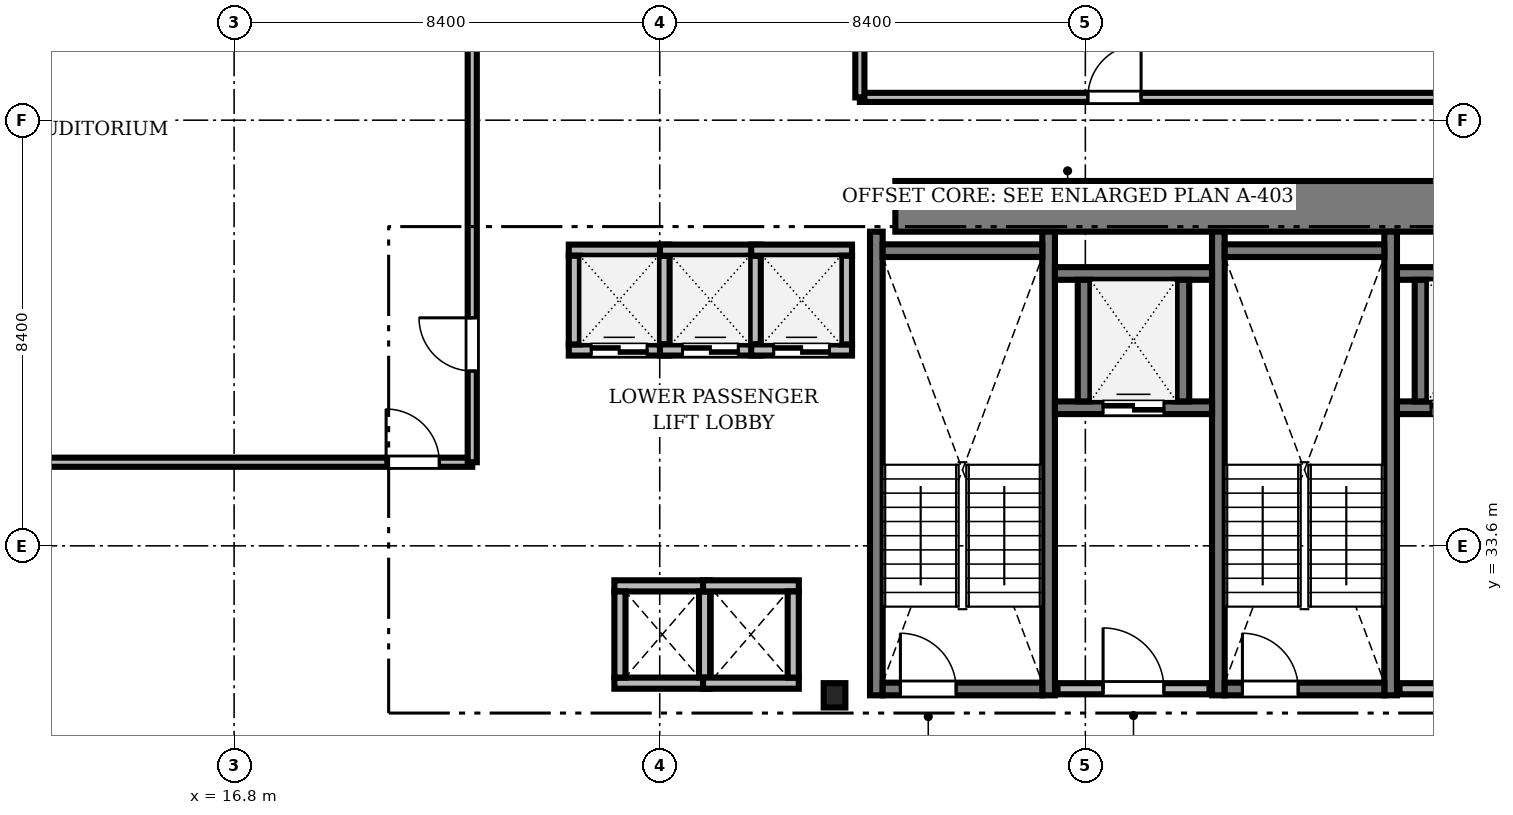
"""IFC4 building model, lengths in metres.
Left out: names, types, materials, properties, quantities, classifications, styles, units other than length and angle.
Written with IfcOpenShell. Run it as: python <this file> out.ifc"""

import sys

from ifc_helpers import new_model, si_unit, direction, frame, frame_2d, origin, origin_2d, place, context, subcontext, project, spatial, rectangle, i_section, extrude, source, transform, mapped, element, fill, save


model = new_model("IFC4")
c1 = context("Model", 3, precision=1e-05, world=origin(), true_north=direction((0.0, 1.0)))
c2 = subcontext(c1, "Body", "Model", "MODEL_VIEW")
j1 = project(units=[si_unit("LENGTHUNIT", "METRE"), si_unit("PLANEANGLEUNIT", "RADIAN")], contexts=[c1])
p1 = place(None, origin())
s1 = spatial("IfcSite", under=j1, at=p1, CompositionType="ELEMENT")
p2 = place(p1, origin())
s2 = spatial("IfcBuilding", under=s1, at=p2, CompositionType="ELEMENT")
p3 = place(p2, frame((0.0, 0.0, 60.45)))
s3 = spatial("IfcBuildingStorey", under=s2, at=p3, CompositionType="ELEMENT", Elevation=60.45)
m1 = source(origin(), c2, "Body", "SweptSolid", [
    extrude(rectangle(XDim=17.52, YDim=1.0, at=frame_2d((8.76, 0.0))), origin(), (0.0, 0.0, 1.0), 3.41),
])
p4 = place(p3, frame((29.85, 40.3, 0.0), z_axis=(0.0, 0.0, 1.0), x_axis=(1.0, 0.0, 0.0)))
e1 = element("IfcWall", 1, at=p4, inside=s3, PredefinedType="SHEAR", context=c2, shape_type="MappedRepresentation", body=[
    mapped(m1, transform((0.0, 0.0, 0.0), scale=1.0)),
])
m2 = source(origin(), c2, "Body", "SweptSolid", [
    extrude(i_section(OverallWidth=0.428, OverallDepth=0.481, WebThickness=0.04, FlangeThickness=0.063, FilletRadius=0.015, at=origin_2d()), origin(), (0.0, 0.0, 1.0), 3.41),
])
p5 = place(p3, frame((28.65, 30.65, 0.0), z_axis=(0.0, 0.0, 1.0), x_axis=(1.0, 0.0, 0.0)))
e2 = element("IfcColumn", 2, at=p5, inside=s3, PredefinedType="COLUMN", context=c2, shape_type="MappedRepresentation", body=[
    mapped(m2, transform((0.0, 0.0, 0.0), scale=1.0)),
])
m3 = source(origin(), c2, "Body", "SweptSolid", [
    extrude(rectangle(XDim=9.15, YDim=0.25, at=frame_2d((4.575, 0.0))), origin(), (0.0, 0.0, 1.0), 3.45),
])
for number, where, z_axis, x_axis in (
    (3, (29.475, 30.65, 0.0), (0.0, 0.0, 1.0), (0.0, 1.0, 0.0)),
    (4, (32.875, 30.65, 0.0), (0.0, 0.0, 1.0), (0.0, 1.0, 0.0)),
):
    element("IfcWall", number, at=place(p3, frame(where, z_axis=z_axis, x_axis=x_axis)), inside=s3, PredefinedType="SOLIDWALL", context=c2, shape_type="MappedRepresentation", body=[
        mapped(m3, transform((0.0, 0.0, 0.0), scale=1.0)),
    ])
m4 = source(origin(), c2, "Body", "SweptSolid", [
    extrude(rectangle(XDim=3.15, YDim=0.25, at=frame_2d((1.575, 0.0))), origin(), (0.0, 0.0, 1.0), 3.45),
])
p6 = place(p3, frame((29.6, 39.425, 0.0), z_axis=(0.0, 0.0, 1.0), x_axis=(1.0, 0.0, 0.0)))
e5 = element("IfcWall", 5, at=p6, inside=s3, PredefinedType="SOLIDWALL", context=c2, shape_type="MappedRepresentation", body=[
    mapped(m4, transform((0.0, 0.0, 0.0), scale=1.0)),
])
p7 = place(p3, frame((29.6, 30.775, 0.0), z_axis=(0.0, 0.0, 1.0), x_axis=(1.0, 0.0, 0.0)))
e6 = element("IfcWall", 6, at=p7, inside=s3, PredefinedType="SOLIDWALL", context=c2, shape_type="MappedRepresentation", body=[
    mapped(m4, transform((0.0, 0.0, 0.0), scale=1.0)),
])
m5 = source(origin(), c2, "Body", "SweptSolid", [
    extrude(rectangle(XDim=1.1, YDim=2.2, at=frame_2d((0.55, 1.1))), frame((0.0, 0.135, 0.0), z_axis=(0.0, -1.0, 0.0), x_axis=(1.0, 0.0, 0.0)), (0.0, 0.0, 1.0), 0.27),
])
p8 = place(p7, frame((0.35, 0.0, 0.0)))
e7 = element("IfcOpeningElement", 7, at=p8, cuts=e6, PredefinedType="OPENING", context=c2, shape_type="MappedRepresentation", body=[
    mapped(m5, transform((0.0, 0.0, 0.0), scale=1.0)),
])
for number, where, z_axis, x_axis in (
    (8, (36.225, 30.65, 0.0), (0.0, 0.0, 1.0), (0.0, 1.0, 0.0)),
    (9, (39.625, 30.65, 0.0), (0.0, 0.0, 1.0), (0.0, 1.0, 0.0)),
):
    element("IfcWall", number, at=place(p3, frame(where, z_axis=z_axis, x_axis=x_axis)), inside=s3, PredefinedType="SOLIDWALL", context=c2, shape_type="MappedRepresentation", body=[
        mapped(m3, transform((0.0, 0.0, 0.0), scale=1.0)),
    ])
p9 = place(p3, frame((36.35, 39.425, 0.0), z_axis=(0.0, 0.0, 1.0), x_axis=(1.0, 0.0, 0.0)))
e10 = element("IfcWall", 10, at=p9, inside=s3, PredefinedType="SOLIDWALL", context=c2, shape_type="MappedRepresentation", body=[
    mapped(m4, transform((0.0, 0.0, 0.0), scale=1.0)),
])
p10 = place(p3, frame((36.35, 30.775, 0.0), z_axis=(0.0, 0.0, 1.0), x_axis=(1.0, 0.0, 0.0)))
e11 = element("IfcWall", 11, at=p10, inside=s3, PredefinedType="SOLIDWALL", context=c2, shape_type="MappedRepresentation", body=[
    mapped(m4, transform((0.0, 0.0, 0.0), scale=1.0)),
])
p11 = place(p10, frame((0.35, 0.0, 0.0)))
e12 = element("IfcOpeningElement", 12, at=p11, cuts=e11, PredefinedType="OPENING", context=c2, shape_type="MappedRepresentation", body=[
    mapped(m5, transform((0.0, 0.0, 0.0), scale=1.0)),
])
m6 = source(origin(), c2, "Body", "SweptSolid", [
    extrude(rectangle(XDim=3.0, YDim=0.22, at=frame_2d((1.5, 0.0))), origin(), (0.0, 0.0, 1.0), 3.41),
])
p12 = place(p3, frame((33.05, 30.78, 0.0), z_axis=(0.0, 0.0, 1.0), x_axis=(1.0, 0.0, 0.0)))
e13 = element("IfcWall", 13, at=p12, inside=s3, PredefinedType="SOLIDWALL", context=c2, shape_type="MappedRepresentation", body=[
    mapped(m6, transform((0.0, 0.0, 0.0), scale=1.0)),
])
m7 = source(origin(), c2, "Body", "SweptSolid", [
    extrude(rectangle(XDim=1.2, YDim=2.2, at=frame_2d((0.6, 1.1))), frame((0.0, 0.12, 0.0), z_axis=(0.0, -1.0, 0.0), x_axis=(1.0, 0.0, 0.0)), (0.0, 0.0, 1.0), 0.24),
])
p13 = place(p12, frame((0.9, 0.0, 0.0)))
e14 = element("IfcOpeningElement", 14, at=p13, cuts=e13, PredefinedType="OPENING", context=c2, shape_type="MappedRepresentation", body=[
    mapped(m7, transform((0.0, 0.0, 0.0), scale=1.0)),
])
m8 = source(origin(), c2, "Body", "SweptSolid", [
    extrude(rectangle(XDim=2.8, YDim=0.22, at=frame_2d((1.4, 0.0))), origin(), (0.0, 0.0, 1.0), 3.41),
])
p14 = place(p3, frame((39.8, 30.78, 0.0), z_axis=(0.0, 0.0, 1.0), x_axis=(1.0, 0.0, 0.0)))
e15 = element("IfcWall", 15, at=p14, inside=s3, PredefinedType="SOLIDWALL", context=c2, shape_type="MappedRepresentation", body=[
    mapped(m8, transform((0.0, 0.0, 0.0), scale=1.0)),
])
p15 = place(p14, frame((0.8, 0.0, 0.0)))
e16 = element("IfcOpeningElement", 16, at=p15, cuts=e15, PredefinedType="OPENING", context=c2, shape_type="MappedRepresentation", body=[
    mapped(m7, transform((0.0, 0.0, 0.0), scale=1.0)),
])
m9 = source(origin(), c2, "Body", "SweptSolid", [
    extrude(rectangle(XDim=1.99, YDim=0.22, at=frame_2d((0.995, 0.0))), origin(), (0.0, 0.0, 1.0), 3.41),
])
p16 = place(p3, frame((23.405, 37.465, 0.0), z_axis=(0.0, 0.0, 1.0), x_axis=(1.0, 0.0, 0.0)))
e17 = element("IfcWall", 17, at=p16, inside=s3, PredefinedType="SOLIDWALL", context=c2, shape_type="MappedRepresentation", body=[
    mapped(m9, transform((0.0, 0.0, 0.0), scale=1.0)),
])
m10 = source(origin(), c2, "Body", "SweptSolid", [
    extrude(rectangle(XDim=1.1, YDim=2.2, at=frame_2d((0.55, 1.1))), frame((0.0, 0.12, 0.0), z_axis=(0.0, -1.0, 0.0), x_axis=(1.0, 0.0, 0.0)), (0.0, 0.0, 1.0), 0.24),
])
p17 = place(p16, frame((0.445, 0.0, 0.0)))
e18 = element("IfcOpeningElement", 18, at=p17, cuts=e17, PredefinedType="OPENING", context=c2, shape_type="MappedRepresentation", body=[
    mapped(m10, transform((0.0, 0.0, 0.0), scale=1.0)),
])
p18 = place(p3, frame((23.405, 39.435, 0.0), z_axis=(0.0, 0.0, 1.0), x_axis=(1.0, 0.0, 0.0)))
e19 = element("IfcWall", 19, at=p18, inside=s3, PredefinedType="SOLIDWALL", context=c2, shape_type="MappedRepresentation", body=[
    mapped(m9, transform((0.0, 0.0, 0.0), scale=1.0)),
])
m11 = source(origin(), c2, "Body", "SweptSolid", [
    extrude(rectangle(XDim=1.75, YDim=0.22, at=frame_2d((0.875, 0.0))), origin(), (0.0, 0.0, 1.0), 3.41),
])
for number, where, z_axis, x_axis in (
    (20, (23.515, 37.575, 0.0), (0.0, 0.0, 1.0), (0.0, 1.0, 0.0)),
    (21, (25.285, 37.575, 0.0), (0.0, 0.0, 1.0), (0.0, 1.0, 0.0)),
):
    element("IfcWall", number, at=place(p3, frame(where, z_axis=z_axis, x_axis=x_axis)), inside=s3, PredefinedType="SOLIDWALL", context=c2, shape_type="MappedRepresentation", body=[
        mapped(m11, transform((0.0, 0.0, 0.0), scale=1.0)),
    ])
p19 = place(p3, frame((25.205, 37.465, 0.0), z_axis=(0.0, 0.0, 1.0), x_axis=(1.0, 0.0, 0.0)))
e22 = element("IfcWall", 22, at=p19, inside=s3, PredefinedType="SOLIDWALL", context=c2, shape_type="MappedRepresentation", body=[
    mapped(m9, transform((0.0, 0.0, 0.0), scale=1.0)),
])
p20 = place(p19, frame((0.445, 0.0, 0.0)))
e23 = element("IfcOpeningElement", 23, at=p20, cuts=e22, PredefinedType="OPENING", context=c2, shape_type="MappedRepresentation", body=[
    mapped(m10, transform((0.0, 0.0, 0.0), scale=1.0)),
])
p21 = place(p3, frame((25.205, 39.435, 0.0), z_axis=(0.0, 0.0, 1.0), x_axis=(1.0, 0.0, 0.0)))
e24 = element("IfcWall", 24, at=p21, inside=s3, PredefinedType="SOLIDWALL", context=c2, shape_type="MappedRepresentation", body=[
    mapped(m9, transform((0.0, 0.0, 0.0), scale=1.0)),
])
p22 = place(p3, frame((27.085, 37.575, 0.0), z_axis=(0.0, 0.0, 1.0), x_axis=(0.0, 1.0, 0.0)))
e25 = element("IfcWall", 25, at=p22, inside=s3, PredefinedType="SOLIDWALL", context=c2, shape_type="MappedRepresentation", body=[
    mapped(m11, transform((0.0, 0.0, 0.0), scale=1.0)),
])
m12 = source(origin(), c2, "Body", "SweptSolid", [
    extrude(rectangle(XDim=1.99, YDim=0.22, at=frame_2d((0.995, 0.0))), origin(), (0.0, 0.0, 1.0), 3.41),
])
p23 = place(p3, frame((27.005, 37.465, 0.0), z_axis=(0.0, 0.0, 1.0), x_axis=(1.0, 0.0, 0.0)))
e26 = element("IfcWall", 26, at=p23, inside=s3, PredefinedType="SOLIDWALL", context=c2, shape_type="MappedRepresentation", body=[
    mapped(m12, transform((0.0, 0.0, 0.0), scale=1.0)),
])
p24 = place(p23, frame((0.445, 0.0, 0.0)))
e27 = element("IfcOpeningElement", 27, at=p24, cuts=e26, PredefinedType="OPENING", context=c2, shape_type="MappedRepresentation", body=[
    mapped(m10, transform((0.0, 0.0, 0.0), scale=1.0)),
])
p25 = place(p3, frame((27.005, 39.435, 0.0), z_axis=(0.0, 0.0, 1.0), x_axis=(1.0, 0.0, 0.0)))
e28 = element("IfcWall", 28, at=p25, inside=s3, PredefinedType="SOLIDWALL", context=c2, shape_type="MappedRepresentation", body=[
    mapped(m12, transform((0.0, 0.0, 0.0), scale=1.0)),
])
p26 = place(p3, frame((28.885, 37.575, 0.0), z_axis=(0.0, 0.0, 1.0), x_axis=(0.0, 1.0, 0.0)))
e29 = element("IfcWall", 29, at=p26, inside=s3, PredefinedType="SOLIDWALL", context=c2, shape_type="MappedRepresentation", body=[
    mapped(m11, transform((0.0, 0.0, 0.0), scale=1.0)),
])
m13 = source(origin(), c2, "Body", "SweptSolid", [
    extrude(rectangle(XDim=3.1, YDim=0.25, at=frame_2d((1.55, 0.0))), origin(), (0.0, 0.0, 1.0), 3.41),
])
p27 = place(p3, frame((33.0, 36.325, 0.0), z_axis=(0.0, 0.0, 1.0), x_axis=(1.0, 0.0, 0.0)))
e30 = element("IfcWall", 30, at=p27, inside=s3, PredefinedType="SOLIDWALL", context=c2, shape_type="MappedRepresentation", body=[
    mapped(m13, transform((0.0, 0.0, 0.0), scale=1.0)),
])
m14 = source(origin(), c2, "Body", "SweptSolid", [
    extrude(rectangle(XDim=1.2, YDim=2.25, at=frame_2d((0.6, 1.125))), frame((0.0, 0.135, 0.0), z_axis=(0.0, -1.0, 0.0), x_axis=(1.0, 0.0, 0.0)), (0.0, 0.0, 1.0), 0.27),
])
p28 = place(p27, frame((0.95, 0.0, 0.0)))
e31 = element("IfcOpeningElement", 31, at=p28, cuts=e30, PredefinedType="OPENING", context=c2, shape_type="MappedRepresentation", body=[
    mapped(m14, transform((0.0, 0.0, 0.0), scale=1.0)),
])
p29 = place(p3, frame((33.0, 38.975, 0.0), z_axis=(0.0, 0.0, 1.0), x_axis=(1.0, 0.0, 0.0)))
e32 = element("IfcWall", 32, at=p29, inside=s3, PredefinedType="SOLIDWALL", context=c2, shape_type="MappedRepresentation", body=[
    mapped(m13, transform((0.0, 0.0, 0.0), scale=1.0)),
])
m15 = source(origin(), c2, "Body", "SweptSolid", [
    extrude(rectangle(XDim=2.4, YDim=0.25, at=frame_2d((1.2, 0.0))), origin(), (0.0, 0.0, 1.0), 3.41),
])
for number, where, z_axis, x_axis in (
    (33, (33.575, 36.45, 0.0), (0.0, 0.0, 1.0), (0.0, 1.0, 0.0)),
    (34, (35.525, 36.45, 0.0), (0.0, 0.0, 1.0), (0.0, 1.0, 0.0)),
):
    element("IfcWall", number, at=place(p3, frame(where, z_axis=z_axis, x_axis=x_axis)), inside=s3, PredefinedType="SOLIDWALL", context=c2, shape_type="MappedRepresentation", body=[
        mapped(m15, transform((0.0, 0.0, 0.0), scale=1.0)),
    ])
m16 = source(origin(), c2, "Body", "SweptSolid", [
    extrude(rectangle(XDim=2.55, YDim=0.25, at=frame_2d((1.275, 0.0))), origin(), (0.0, 0.0, 1.0), 3.41),
])
p30 = place(p3, frame((39.75, 36.325, 0.0), z_axis=(0.0, 0.0, 1.0), x_axis=(1.0, 0.0, 0.0)))
e35 = element("IfcWall", 35, at=p30, inside=s3, PredefinedType="SOLIDWALL", context=c2, shape_type="MappedRepresentation", body=[
    mapped(m16, transform((0.0, 0.0, 0.0), scale=1.0)),
])
p31 = place(p30, frame((0.675, 0.0, 0.0)))
e36 = element("IfcOpeningElement", 36, at=p31, cuts=e35, PredefinedType="OPENING", context=c2, shape_type="MappedRepresentation", body=[
    mapped(m14, transform((0.0, 0.0, 0.0), scale=1.0)),
])
p32 = place(p3, frame((39.75, 38.975, 0.0), z_axis=(0.0, 0.0, 1.0), x_axis=(1.0, 0.0, 0.0)))
e37 = element("IfcWall", 37, at=p32, inside=s3, PredefinedType="SOLIDWALL", context=c2, shape_type="MappedRepresentation", body=[
    mapped(m16, transform((0.0, 0.0, 0.0), scale=1.0)),
])
p33 = place(p3, frame((40.225, 36.45, 0.0), z_axis=(0.0, 0.0, 1.0), x_axis=(0.0, 1.0, 0.0)))
e38 = element("IfcWall", 38, at=p33, inside=s3, PredefinedType="SOLIDWALL", context=c2, shape_type="MappedRepresentation", body=[
    mapped(m15, transform((0.0, 0.0, 0.0), scale=1.0)),
])
m17 = source(origin(), c2, "Body", "SweptSolid", [
    extrude(rectangle(XDim=1.89, YDim=0.22, at=frame_2d((0.945, 0.0))), origin(), (0.0, 0.0, 1.0), 3.41),
])
for number, where, z_axis, x_axis in (
    (39, (24.305, 30.89, 0.0), (0.0, 0.0, 1.0), (1.0, 0.0, 0.0)),
    (40, (24.305, 32.81, 0.0), (0.0, 0.0, 1.0), (1.0, 0.0, 0.0)),
):
    element("IfcWall", number, at=place(p3, frame(where, z_axis=z_axis, x_axis=x_axis)), inside=s3, PredefinedType="SOLIDWALL", context=c2, shape_type="MappedRepresentation", body=[
        mapped(m17, transform((0.0, 0.0, 0.0), scale=1.0)),
    ])
m18 = source(origin(), c2, "Body", "SweptSolid", [
    extrude(rectangle(XDim=1.7, YDim=0.22, at=frame_2d((0.85, 0.0))), origin(), (0.0, 0.0, 1.0), 3.41),
])
for number, where, z_axis, x_axis in (
    (41, (24.415, 31.0, 0.0), (0.0, 0.0, 1.0), (0.0, 1.0, 0.0)),
    (42, (26.085, 31.0, 0.0), (0.0, 0.0, 1.0), (0.0, 1.0, 0.0)),
):
    element("IfcWall", number, at=place(p3, frame(where, z_axis=z_axis, x_axis=x_axis)), inside=s3, PredefinedType="SOLIDWALL", context=c2, shape_type="MappedRepresentation", body=[
        mapped(m18, transform((0.0, 0.0, 0.0), scale=1.0)),
    ])
for number, where, z_axis, x_axis in (
    (43, (26.055, 30.89, 0.0), (0.0, 0.0, 1.0), (1.0, 0.0, 0.0)),
    (44, (26.055, 32.81, 0.0), (0.0, 0.0, 1.0), (1.0, 0.0, 0.0)),
):
    element("IfcWall", number, at=place(p3, frame(where, z_axis=z_axis, x_axis=x_axis)), inside=s3, PredefinedType="SOLIDWALL", context=c2, shape_type="MappedRepresentation", body=[
        mapped(m17, transform((0.0, 0.0, 0.0), scale=1.0)),
    ])
p34 = place(p3, frame((27.835, 31.0, 0.0), z_axis=(0.0, 0.0, 1.0), x_axis=(0.0, 1.0, 0.0)))
e45 = element("IfcWall", 45, at=p34, inside=s3, PredefinedType="SOLIDWALL", context=c2, shape_type="MappedRepresentation", body=[
    mapped(m18, transform((0.0, 0.0, 0.0), scale=1.0)),
])
m19 = source(origin(), c2, "Body", "SweptSolid", [
    extrude(rectangle(XDim=19.428, YDim=0.18, at=frame_2d((9.714, 0.0))), origin(), (0.0, 0.0, 1.0), 2.652),
])
p35 = place(p3, frame((29.15, 42.45, 0.0), z_axis=(0.0, 0.0, 1.0), x_axis=(1.0, 0.0, 0.0)))
e46 = element("IfcWall", 46, at=p35, inside=s3, PredefinedType="PARTITIONING", context=c2, shape_type="MappedRepresentation", body=[
    mapped(m19, transform((0.0, 0.0, 0.0), scale=1.0)),
])
m20 = source(origin(), c2, "Body", "SweptSolid", [
    extrude(rectangle(XDim=1.05, YDim=2.2, at=frame_2d((0.525, 1.1))), frame((0.0, 0.1, 0.0), z_axis=(0.0, -1.0, 0.0), x_axis=(1.0, 0.0, 0.0)), (0.0, 0.0, 1.0), 0.2),
])
p36 = place(p35, frame((4.5, 0.0, 0.0)))
e47 = element("IfcOpeningElement", 47, at=p36, cuts=e46, PredefinedType="OPENING", context=c2, shape_type="MappedRepresentation", body=[
    mapped(m20, transform((0.0, 0.0, 0.0), scale=1.0)),
])
m21 = source(origin(), c2, "Body", "SweptSolid", [
    extrude(rectangle(XDim=19.078, YDim=0.18, at=frame_2d((9.539, 0.0))), origin(), (0.0, 0.0, 1.0), 2.652),
])
p37 = place(p3, frame((2.422, 35.25, 0.0), z_axis=(0.0, 0.0, 1.0), x_axis=(1.0, 0.0, 0.0)))
e48 = element("IfcWall", 48, at=p37, inside=s3, PredefinedType="PARTITIONING", context=c2, shape_type="MappedRepresentation", body=[
    mapped(m21, transform((0.0, 0.0, 0.0), scale=1.0)),
])
p38 = place(p37, frame((17.378, 0.0, 0.0)))
e49 = element("IfcOpeningElement", 49, at=p38, cuts=e48, PredefinedType="OPENING", context=c2, shape_type="MappedRepresentation", body=[
    mapped(m20, transform((0.0, 0.0, 0.0), scale=1.0)),
])
m22 = source(origin(), c2, "Body", "SweptSolid", [
    extrude(rectangle(XDim=13.028, YDim=0.18, at=frame_2d((6.514, 0.0))), origin(), (0.0, 0.0, 1.0), 2.652),
])
p39 = place(p3, frame((21.5, 35.25, 0.0), z_axis=(0.0, 0.0, 1.0), x_axis=(0.0, 1.0, 0.0)))
e50 = element("IfcWall", 50, at=p39, inside=s3, PredefinedType="PARTITIONING", context=c2, shape_type="MappedRepresentation", body=[
    mapped(m22, transform((0.0, 0.0, 0.0), scale=1.0)),
])
p40 = place(p39, frame((1.8, 0.0, 0.0)))
e51 = element("IfcOpeningElement", 51, at=p40, cuts=e50, PredefinedType="OPENING", context=c2, shape_type="MappedRepresentation", body=[
    mapped(m20, transform((0.0, 0.0, 0.0), scale=1.0)),
])
m23 = source(origin(), c2, "Body", "SweptSolid", [
    extrude(rectangle(XDim=5.828, YDim=0.18, at=frame_2d((2.914, 0.0))), origin(), (0.0, 0.0, 1.0), 2.652),
])
p41 = place(p3, frame((29.15, 42.45, 0.0), z_axis=(0.0, 0.0, 1.0), x_axis=(0.0, 1.0, 0.0)))
e52 = element("IfcWall", 52, at=p41, inside=s3, PredefinedType="PARTITIONING", context=c2, shape_type="MappedRepresentation", body=[
    mapped(m23, transform((0.0, 0.0, 0.0), scale=1.0)),
])
m24 = source(origin(), c2, "Body", "SweptSolid", [
    extrude(rectangle(XDim=1.1, YDim=2.2, at=frame_2d((0.55, 1.1))), frame((0.0, 0.025, 0.0), z_axis=(0.0, -1.0, 0.0), x_axis=(1.0, 0.0, 0.0)), (0.0, 0.0, 1.0), 0.05),
])
p42 = place(p8, origin())
e53 = element("IfcDoor", 53, at=p42, inside=s3, OperationType="SINGLE_SWING_LEFT", PredefinedType="DOOR", context=c2, shape_type="MappedRepresentation", body=[
    mapped(m24, transform((0.0, 0.0, 0.0), scale=1.0)),
])
fill(e7, e53)
p43 = place(p11, origin())
e54 = element("IfcDoor", 54, at=p43, inside=s3, OperationType="SINGLE_SWING_LEFT", PredefinedType="DOOR", context=c2, shape_type="MappedRepresentation", body=[
    mapped(m24, transform((0.0, 0.0, 0.0), scale=1.0)),
])
fill(e12, e54)
m25 = source(origin(), c2, "Body", "SweptSolid", [
    extrude(rectangle(XDim=1.2, YDim=2.2, at=frame_2d((0.6, 1.1))), frame((0.0, 0.025, 0.0), z_axis=(0.0, -1.0, 0.0), x_axis=(1.0, 0.0, 0.0)), (0.0, 0.0, 1.0), 0.05),
])
p44 = place(p13, origin())
e55 = element("IfcDoor", 55, at=p44, inside=s3, OperationType="SINGLE_SWING_LEFT", PredefinedType="DOOR", context=c2, shape_type="MappedRepresentation", body=[
    mapped(m25, transform((0.0, 0.0, 0.0), scale=1.0)),
])
fill(e14, e55)
p45 = place(p17, origin())
e56 = element("IfcDoor", 56, at=p45, inside=s3, OperationType="DOUBLE_DOOR_SLIDING", PredefinedType="DOOR", context=c2, shape_type="MappedRepresentation", body=[
    mapped(m24, transform((0.0, 0.0, 0.0), scale=1.0)),
])
fill(e18, e56)
p46 = place(p20, origin())
e57 = element("IfcDoor", 57, at=p46, inside=s3, OperationType="DOUBLE_DOOR_SLIDING", PredefinedType="DOOR", context=c2, shape_type="MappedRepresentation", body=[
    mapped(m24, transform((0.0, 0.0, 0.0), scale=1.0)),
])
fill(e23, e57)
p47 = place(p24, origin())
e58 = element("IfcDoor", 58, at=p47, inside=s3, OperationType="DOUBLE_DOOR_SLIDING", PredefinedType="DOOR", context=c2, shape_type="MappedRepresentation", body=[
    mapped(m24, transform((0.0, 0.0, 0.0), scale=1.0)),
])
fill(e27, e58)
m26 = source(origin(), c2, "Body", "SweptSolid", [
    extrude(rectangle(XDim=1.2, YDim=2.25, at=frame_2d((0.6, 1.125))), frame((0.0, 0.025, 0.0), z_axis=(0.0, -1.0, 0.0), x_axis=(1.0, 0.0, 0.0)), (0.0, 0.0, 1.0), 0.05),
])
p48 = place(p28, origin())
e59 = element("IfcDoor", 59, at=p48, inside=s3, OperationType="DOUBLE_DOOR_SLIDING", PredefinedType="DOOR", context=c2, shape_type="MappedRepresentation", body=[
    mapped(m26, transform((0.0, 0.0, 0.0), scale=1.0)),
])
fill(e31, e59)
p49 = place(p31, origin())
e60 = element("IfcDoor", 60, at=p49, inside=s3, OperationType="DOUBLE_DOOR_SLIDING", PredefinedType="DOOR", context=c2, shape_type="MappedRepresentation", body=[
    mapped(m26, transform((0.0, 0.0, 0.0), scale=1.0)),
])
fill(e36, e60)
m27 = source(origin(), c2, "Body", "SweptSolid", [
    extrude(rectangle(XDim=1.05, YDim=2.2, at=frame_2d((0.525, 1.1))), frame((0.0, 0.025, 0.0), z_axis=(0.0, -1.0, 0.0), x_axis=(1.0, 0.0, 0.0)), (0.0, 0.0, 1.0), 0.05),
])
p50 = place(p36, origin())
e61 = element("IfcDoor", 61, at=p50, inside=s3, OperationType="SINGLE_SWING_RIGHT", PredefinedType="DOOR", context=c2, shape_type="MappedRepresentation", body=[
    mapped(m27, transform((0.0, 0.0, 0.0), scale=1.0)),
])
fill(e47, e61)
p51 = place(p38, origin())
e62 = element("IfcDoor", 62, at=p51, inside=s3, OperationType="SINGLE_SWING_LEFT", PredefinedType="DOOR", context=c2, shape_type="MappedRepresentation", body=[
    mapped(m27, transform((0.0, 0.0, 0.0), scale=1.0)),
])
fill(e49, e62)
p52 = place(p40, origin())
e63 = element("IfcDoor", 63, at=p52, inside=s3, OperationType="SINGLE_SWING_RIGHT", PredefinedType="DOOR", context=c2, shape_type="MappedRepresentation", body=[
    mapped(m27, transform((0.0, 0.0, 0.0), scale=1.0)),
])
fill(e51, e63)
save(model, sys.argv[1])
